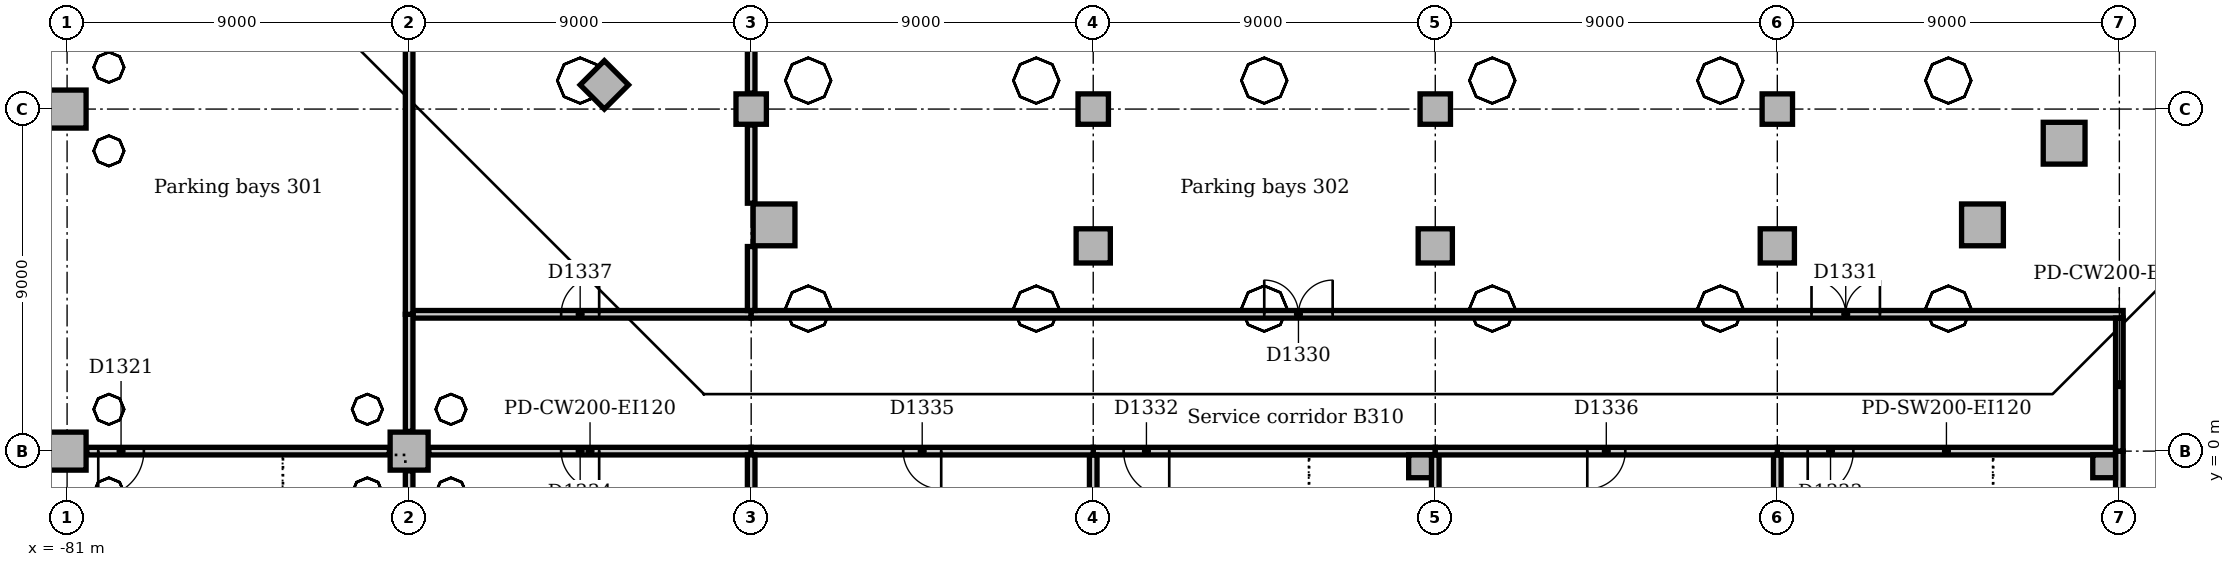
"""IFC4 building model, lengths in metres.
Left out: names, types, materials, properties, quantities, classifications, styles, units other than length and angle.
Written with IfcOpenShell. Run it as: python <this file> out.ifc"""

import sys

from ifc_helpers import new_model, si_unit, direction, frame, frame_2d, origin, origin_2d, place, context, subcontext, project, spatial, rectangle, extrude, element, fill, save


model = new_model("IFC4")
c1 = context("Model", 3, precision=1e-05, world=origin(), true_north=direction((0.0, 1.0)))
c2 = subcontext(c1, "Body", "Model", "MODEL_VIEW")
j1 = project(units=[si_unit("LENGTHUNIT", "METRE"), si_unit("PLANEANGLEUNIT", "RADIAN")], contexts=[c1])
p1 = place(None, origin())
s1 = spatial("IfcSite", under=j1, at=p1, CompositionType="ELEMENT")
p2 = place(p1, origin())
s2 = spatial("IfcBuilding", under=s1, at=p2, CompositionType="ELEMENT")
p3 = place(p2, frame((0.0, 0.0, -14.0)))
s3 = spatial("IfcBuildingStorey", under=s2, at=p3, CompositionType="ELEMENT", Elevation=-14.0)
for number, where, z_axis, x_axis in (
    (1, (-62.398, 5.953, 0.0), (0.0, 0.0, 1.0), (1.0, 0.0, 0.0)),
    (2, (-30.602, 5.953, 0.0), (0.0, 0.0, 1.0), (1.0, 0.0, 0.0)),
    (3, (-28.453, 8.102, 0.0), (0.0, 0.0, 1.0), (1.0, 0.0, 0.0)),
):
    element("IfcColumn", number, at=place(p3, frame(where, z_axis=z_axis, x_axis=x_axis)), inside=s3, PredefinedType="COLUMN", context=c2, shape_type="SweptSolid", body=[
        extrude(rectangle(XDim=1.1, YDim=1.1, at=origin_2d()), origin(), (0.0, 0.0, 1.0), 4.15),
    ])
for number, where, z_axis, x_axis in (
    (4, (-54.0, 5.4, 0.0), (0.0, 0.0, 1.0), (1.0, 0.0, 0.0)),
    (5, (-45.0, 5.4, 0.0), (0.0, 0.0, 1.0), (1.0, 0.0, 0.0)),
    (6, (-36.0, 5.4, 0.0), (0.0, 0.0, 1.0), (1.0, 0.0, 0.0)),
    (7, (-66.864, 9.636, 0.0), (0.0, 0.0, 1.0), (0.707, 0.707, 0.0)),
):
    element("IfcColumn", number, at=place(p3, frame(where, z_axis=z_axis, x_axis=x_axis)), inside=s3, PredefinedType="COLUMN", context=c2, shape_type="SweptSolid", body=[
        extrude(rectangle(XDim=0.9, YDim=0.9, at=origin_2d()), origin(), (0.0, 0.0, 1.0), 4.15),
    ])
for number, where, z_axis, x_axis in (
    (8, (-63.0, 9.0, 0.0), (0.0, 0.0, 1.0), (1.0, 0.0, 0.0)),
    (9, (-54.0, 9.0, 0.0), (0.0, 0.0, 1.0), (1.0, 0.0, 0.0)),
    (10, (-45.0, 9.0, 0.0), (0.0, 0.0, 1.0), (1.0, 0.0, 0.0)),
    (11, (-36.0, 9.0, 0.0), (0.0, 0.0, 1.0), (1.0, 0.0, 0.0)),
):
    element("IfcColumn", number, at=place(p3, frame(where, z_axis=z_axis, x_axis=x_axis)), inside=s3, PredefinedType="COLUMN", context=c2, shape_type="SweptSolid", body=[
        extrude(rectangle(XDim=0.8, YDim=0.8, at=origin_2d()), origin(), (0.0, 0.0, 1.0), 4.15),
    ])
for number, where, z_axis, x_axis in (
    (12, (-81.0, 0.0, 0.0), (0.0, 0.0, 1.0), (1.0, 0.0, 0.0)),
    (13, (-81.0, 9.0, 0.0), (0.0, 0.0, 1.0), (1.0, 0.0, 0.0)),
    (14, (-72.0, 0.0, 0.0), (0.0, 0.0, 1.0), (1.0, 0.0, 0.0)),
):
    element("IfcColumn", number, at=place(p3, frame(where, z_axis=z_axis, x_axis=x_axis)), inside=s3, PredefinedType="COLUMN", context=c2, shape_type="SweptSolid", body=[
        extrude(rectangle(XDim=1.0, YDim=1.0, at=origin_2d()), origin(), (0.0, 0.0, 1.0), 4.15),
    ])
for number, where, z_axis, x_axis in (
    (15, (-45.4, -0.4, 0.0), (0.0, 0.0, 1.0), (1.0, 0.0, 0.0)),
    (16, (-27.4, -0.4, 0.0), (0.0, 0.0, 1.0), (1.0, 0.0, 0.0)),
):
    element("IfcColumn", number, at=place(p3, frame(where, z_axis=z_axis, x_axis=x_axis)), inside=s3, PredefinedType="COLUMN", context=c2, shape_type="SweptSolid", body=[
        extrude(rectangle(XDim=0.6, YDim=0.6, at=origin_2d()), origin(), (0.0, 0.0, 1.0), 4.5),
    ])
p4 = place(p3, frame((-72.0, -4.65, 0.0), z_axis=(0.0, 0.0, 1.0), x_axis=(0.0, 1.0, 0.0)))
e17 = element("IfcWall", 17, at=p4, inside=s3, PredefinedType="SOLIDWALL", context=c2, shape_type="SweptSolid", body=[
    extrude(rectangle(XDim=4.13, YDim=0.2, at=frame_2d((2.065, 0.0))), origin(), (0.0, 0.0, 1.0), 4.15),
])
p5 = place(p3, frame((-80.48, 0.0, 0.0), z_axis=(0.0, 0.0, 1.0), x_axis=(1.0, 0.0, 0.0)))
e18 = element("IfcWall", 18, at=p5, inside=s3, PredefinedType="SOLIDWALL", context=c2, shape_type="SweptSolid", body=[
    extrude(rectangle(XDim=7.96, YDim=0.2, at=frame_2d((3.98, 0.0))), origin(), (0.0, 0.0, 1.0), 4.15),
])
p6 = place(p5, frame((0.3, 0.0, 0.0)))
e19 = element("IfcOpeningElement", 19, at=p6, cuts=e18, PredefinedType="OPENING", context=c2, shape_type="SweptSolid", body=[
    extrude(rectangle(XDim=1.2, YDim=2.1, at=frame_2d((0.6, 1.05))), frame((0.0, 0.11, 0.0), z_axis=(0.0, -1.0, 0.0), x_axis=(1.0, 0.0, 0.0)), (0.0, 0.0, 1.0), 0.22),
])
p7 = place(p3, frame((-54.0, 0.0, 0.0), z_axis=(0.0, 0.0, 1.0), x_axis=(1.0, 0.0, 0.0)))
e20 = element("IfcWall", 20, at=p7, inside=s3, PredefinedType="SOLIDWALL", context=c2, shape_type="SweptSolid", body=[
    extrude(rectangle(XDim=9.0, YDim=0.2, at=frame_2d((4.5, 0.0))), origin(), (0.0, 0.0, 1.0), 4.15),
])
p8 = place(p7, frame((0.8, 0.0, 0.0)))
e21 = element("IfcOpeningElement", 21, at=p8, cuts=e20, PredefinedType="OPENING", context=c2, shape_type="SweptSolid", body=[
    extrude(rectangle(XDim=1.2, YDim=2.1, at=frame_2d((0.6, 1.05))), frame((0.0, 0.11, 0.0), z_axis=(0.0, -1.0, 0.0), x_axis=(1.0, 0.0, 0.0)), (0.0, 0.0, 1.0), 0.22),
])
for number, where, z_axis, x_axis in (
    (22, (-54.0, -4.65, 0.0), (0.0, 0.0, 1.0), (0.0, 1.0, 0.0)),
    (23, (-45.0, -4.65, 0.0), (0.0, 0.0, 1.0), (0.0, 1.0, 0.0)),
):
    element("IfcWall", number, at=place(p3, frame(where, z_axis=z_axis, x_axis=x_axis)), inside=s3, PredefinedType="SOLIDWALL", context=c2, shape_type="SweptSolid", body=[
        extrude(rectangle(XDim=4.55, YDim=0.2, at=frame_2d((2.275, 0.0))), origin(), (0.0, 0.0, 1.0), 4.15),
    ])
p9 = place(p3, frame((-36.0, 0.0, 0.0), z_axis=(0.0, 0.0, 1.0), x_axis=(1.0, 0.0, 0.0)))
e24 = element("IfcWall", 24, at=p9, inside=s3, PredefinedType="SOLIDWALL", context=c2, shape_type="SweptSolid", body=[
    extrude(rectangle(XDim=8.9, YDim=0.2, at=frame_2d((4.45, 0.0))), origin(), (0.0, 0.0, 1.0), 4.15),
])
p10 = place(p9, frame((0.8, 0.0, 0.0)))
e25 = element("IfcOpeningElement", 25, at=p10, cuts=e24, PredefinedType="OPENING", context=c2, shape_type="SweptSolid", body=[
    extrude(rectangle(XDim=1.2, YDim=2.1, at=frame_2d((0.6, 1.05))), frame((0.0, 0.11, 0.0), z_axis=(0.0, -1.0, 0.0), x_axis=(1.0, 0.0, 0.0)), (0.0, 0.0, 1.0), 0.22),
])
for number, where, z_axis, x_axis in (
    (26, (-36.0, -4.65, 0.0), (0.0, 0.0, 1.0), (0.0, 1.0, 0.0)),
    (27, (-27.0, -4.55, 0.0), (0.0, 0.0, 1.0), (0.0, 1.0, 0.0)),
):
    element("IfcWall", number, at=place(p3, frame(where, z_axis=z_axis, x_axis=x_axis)), inside=s3, PredefinedType="SOLIDWALL", context=c2, shape_type="SweptSolid", body=[
        extrude(rectangle(XDim=4.55, YDim=0.2, at=frame_2d((2.275, 0.0))), origin(), (0.0, 0.0, 1.0), 4.15),
    ])
p11 = place(p3, frame((-71.48, 0.0, 0.0), z_axis=(0.0, 0.0, 1.0), x_axis=(1.0, 0.0, 0.0)))
e28 = element("IfcWall", 28, at=p11, inside=s3, PredefinedType="PARTITIONING", context=c2, shape_type="SweptSolid", body=[
    extrude(rectangle(XDim=8.48, YDim=0.2, at=frame_2d((4.24, 0.0))), origin(), (0.0, 0.0, 1.0), 4.15),
])
p12 = place(p11, frame((3.48, 0.0, 0.0)))
e29 = element("IfcOpeningElement", 29, at=p12, cuts=e28, PredefinedType="OPENING", context=c2, shape_type="SweptSolid", body=[
    extrude(rectangle(XDim=1.0, YDim=2.1, at=frame_2d((0.5, 1.05))), frame((0.0, 0.11, 0.0), z_axis=(0.0, -1.0, 0.0), x_axis=(1.0, 0.0, 0.0)), (0.0, 0.0, 1.0), 0.22),
])
p13 = place(p3, frame((-63.0, 0.0, 0.0), z_axis=(0.0, 0.0, 1.0), x_axis=(1.0, 0.0, 0.0)))
e30 = element("IfcWall", 30, at=p13, inside=s3, PredefinedType="PARTITIONING", context=c2, shape_type="SweptSolid", body=[
    extrude(rectangle(XDim=9.0, YDim=0.2, at=frame_2d((4.5, 0.0))), origin(), (0.0, 0.0, 1.0), 4.15),
])
p14 = place(p13, frame((4.0, 0.0, 0.0)))
e31 = element("IfcOpeningElement", 31, at=p14, cuts=e30, PredefinedType="OPENING", context=c2, shape_type="SweptSolid", body=[
    extrude(rectangle(XDim=1.0, YDim=2.1, at=frame_2d((0.5, 1.05))), frame((0.0, 0.11, 0.0), z_axis=(0.0, -1.0, 0.0), x_axis=(1.0, 0.0, 0.0)), (0.0, 0.0, 1.0), 0.22),
])
p15 = place(p3, frame((-45.0, 0.0, 0.0), z_axis=(0.0, 0.0, 1.0), x_axis=(1.0, 0.0, 0.0)))
e32 = element("IfcWall", 32, at=p15, inside=s3, PredefinedType="PARTITIONING", context=c2, shape_type="SweptSolid", body=[
    extrude(rectangle(XDim=9.0, YDim=0.2, at=frame_2d((4.5, 0.0))), origin(), (0.0, 0.0, 1.0), 4.15),
])
p16 = place(p15, frame((4.0, 0.0, 0.0)))
e33 = element("IfcOpeningElement", 33, at=p16, cuts=e32, PredefinedType="OPENING", context=c2, shape_type="SweptSolid", body=[
    extrude(rectangle(XDim=1.0, YDim=2.1, at=frame_2d((0.5, 1.05))), frame((0.0, 0.11, 0.0), z_axis=(0.0, -1.0, 0.0), x_axis=(1.0, 0.0, 0.0)), (0.0, 0.0, 1.0), 0.22),
])
p17 = place(p3, frame((-71.9, 3.6, 0.0), z_axis=(0.0, 0.0, 1.0), x_axis=(1.0, 0.0, 0.0)))
e34 = element("IfcWall", 34, at=p17, inside=s3, PredefinedType="PARTITIONING", context=c2, shape_type="SweptSolid", body=[
    extrude(rectangle(XDim=8.9, YDim=0.2, at=frame_2d((4.45, 0.0))), origin(), (0.0, 0.0, 1.0), 4.15),
])
p18 = place(p17, frame((3.9, 0.0, 0.0)))
e35 = element("IfcOpeningElement", 35, at=p18, cuts=e34, PredefinedType="OPENING", context=c2, shape_type="SweptSolid", body=[
    extrude(rectangle(XDim=1.0, YDim=2.1, at=frame_2d((0.5, 1.05))), frame((0.0, 0.11, 0.0), z_axis=(0.0, -1.0, 0.0), x_axis=(1.0, 0.0, 0.0)), (0.0, 0.0, 1.0), 0.22),
])
p19 = place(p3, frame((-63.0, 3.6, 0.0), z_axis=(0.0, 0.0, 1.0), x_axis=(1.0, 0.0, 0.0)))
e36 = element("IfcWall", 36, at=p19, inside=s3, PredefinedType="PARTITIONING", context=c2, shape_type="SweptSolid", body=[
    extrude(rectangle(XDim=36.1, YDim=0.2, at=frame_2d((18.05, 0.0))), origin(), (0.0, 0.0, 1.0), 4.15),
])
p20 = place(p19, frame((13.5, 0.0, 0.0)))
e37 = element("IfcOpeningElement", 37, at=p20, cuts=e36, PredefinedType="OPENING", context=c2, shape_type="SweptSolid", body=[
    extrude(rectangle(XDim=1.8, YDim=2.1, at=frame_2d((0.9, 1.05))), frame((0.0, 0.11, 0.0), z_axis=(0.0, -1.0, 0.0), x_axis=(1.0, 0.0, 0.0)), (0.0, 0.0, 1.0), 0.22),
])
p21 = place(p19, frame((27.9, 0.0, 0.0)))
e38 = element("IfcOpeningElement", 38, at=p21, cuts=e36, PredefinedType="OPENING", context=c2, shape_type="SweptSolid", body=[
    extrude(rectangle(XDim=1.8, YDim=2.1, at=frame_2d((0.9, 1.05))), frame((0.0, 0.11, 0.0), z_axis=(0.0, -1.0, 0.0), x_axis=(1.0, 0.0, 0.0)), (0.0, 0.0, 1.0), 0.22),
])
p22 = place(p3, frame((-27.0, 0.0, 0.0), z_axis=(0.0, 0.0, 1.0), x_axis=(0.0, 1.0, 0.0)))
e39 = element("IfcWall", 39, at=p22, inside=s3, PredefinedType="PARTITIONING", context=c2, shape_type="SweptSolid", body=[
    extrude(rectangle(XDim=3.5, YDim=0.2, at=frame_2d((1.75, 0.0))), origin(), (0.0, 0.0, 1.0), 4.15),
])
p23 = place(p3, frame((-72.0, 0.52, 0.0), z_axis=(0.0, 0.0, 1.0), x_axis=(0.0, 1.0, 0.0)))
e40 = element("IfcWall", 40, at=p23, inside=s3, PredefinedType="PARTITIONING", context=c2, shape_type="SweptSolid", body=[
    extrude(rectangle(XDim=3.08, YDim=0.2, at=frame_2d((1.54, 0.0))), origin(), (0.0, 0.0, 1.0), 4.15),
])
p24 = place(p3, frame((-63.0, -8.48, 0.0), z_axis=(0.0, 0.0, 1.0), x_axis=(0.0, 1.0, 0.0)))
e41 = element("IfcWall", 41, at=p24, inside=s3, PredefinedType="PARTITIONING", context=c2, shape_type="SweptSolid", body=[
    extrude(rectangle(XDim=8.38, YDim=0.2, at=frame_2d((4.19, 0.0))), origin(), (0.0, 0.0, 1.0), 4.15),
])
p25 = place(p3, frame((-63.0, 3.7, 0.0), z_axis=(0.0, 0.0, 1.0), x_axis=(0.0, 1.0, 0.0)))
e42 = element("IfcWall", 42, at=p25, inside=s3, PredefinedType="PARTITIONING", context=c2, shape_type="SweptSolid", body=[
    extrude(rectangle(XDim=1.683, YDim=0.2, at=frame_2d((0.842, 0.0))), origin(), (0.0, 0.0, 1.0), 4.15),
])
p26 = place(p3, frame((-63.0, 6.523, 0.0), z_axis=(0.0, 0.0, 1.0), x_axis=(0.0, 1.0, 0.0)))
e43 = element("IfcWall", 43, at=p26, inside=s3, PredefinedType="PARTITIONING", context=c2, shape_type="SweptSolid", body=[
    extrude(rectangle(XDim=2.057, YDim=0.2, at=frame_2d((1.028, 0.0))), origin(), (0.0, 0.0, 1.0), 4.15),
])
p27 = place(p3, frame((-63.0, 9.42, 0.0), z_axis=(0.0, 0.0, 1.0), x_axis=(0.0, 1.0, 0.0)))
e44 = element("IfcWall", 44, at=p27, inside=s3, PredefinedType="PARTITIONING", context=c2, shape_type="SweptSolid", body=[
    extrude(rectangle(XDim=8.16, YDim=0.2, at=frame_2d((4.08, 0.0))), origin(), (0.0, 0.0, 1.0), 4.15),
])
p28 = place(p3, frame((-72.0, 3.6, 0.0), z_axis=(0.0, 0.0, 1.0), x_axis=(0.0, 1.0, 0.0)))
e45 = element("IfcWall", 45, at=p28, inside=s3, PredefinedType="PARTITIONING", context=c2, shape_type="SweptSolid", body=[
    extrude(rectangle(XDim=17.3, YDim=0.2, at=frame_2d((8.65, 0.0))), origin(), (0.0, 0.0, 1.0), 4.15),
])
p29 = place(p6, frame((1.2, 0.0, 0.0), z_axis=(0.0, 0.0, 1.0), x_axis=(-1.0, 0.0, 0.0)))
e46 = element("IfcDoor", 46, at=p29, inside=s3, OperationType="SINGLE_SWING_RIGHT", PredefinedType="DOOR", context=c2, shape_type="SweptSolid", body=[
    extrude(rectangle(XDim=1.2, YDim=2.1, at=frame_2d((0.6, 1.05))), frame((0.0, 0.025, 0.0), z_axis=(0.0, -1.0, 0.0), x_axis=(1.0, 0.0, 0.0)), (0.0, 0.0, 1.0), 0.05),
])
fill(e19, e46)
p30 = place(p20, origin())
e47 = element("IfcDoor", 47, at=p30, inside=s3, OperationType="DOUBLE_DOOR_SINGLE_SWING", PredefinedType="DOOR", context=c2, shape_type="SweptSolid", body=[
    extrude(rectangle(XDim=1.8, YDim=2.1, at=frame_2d((0.9, 1.05))), frame((0.0, 0.025, 0.0), z_axis=(0.0, -1.0, 0.0), x_axis=(1.0, 0.0, 0.0)), (0.0, 0.0, 1.0), 0.05),
])
fill(e37, e47)
p31 = place(p21, origin())
e48 = element("IfcDoor", 48, at=p31, inside=s3, OperationType="DOUBLE_DOOR_SINGLE_SWING", PredefinedType="DOOR", context=c2, shape_type="SweptSolid", body=[
    extrude(rectangle(XDim=1.8, YDim=2.1, at=frame_2d((0.9, 1.05))), frame((0.0, 0.025, 0.0), z_axis=(0.0, -1.0, 0.0), x_axis=(1.0, 0.0, 0.0)), (0.0, 0.0, 1.0), 0.05),
])
fill(e38, e48)
p32 = place(p8, frame((1.2, 0.0, 0.0), z_axis=(0.0, 0.0, 1.0), x_axis=(-1.0, 0.0, 0.0)))
e49 = element("IfcDoor", 49, at=p32, inside=s3, OperationType="SINGLE_SWING_LEFT", PredefinedType="DOOR", context=c2, shape_type="SweptSolid", body=[
    extrude(rectangle(XDim=1.2, YDim=2.1, at=frame_2d((0.6, 1.05))), frame((0.0, 0.025, 0.0), z_axis=(0.0, -1.0, 0.0), x_axis=(1.0, 0.0, 0.0)), (0.0, 0.0, 1.0), 0.05),
])
fill(e21, e49)
p33 = place(p10, frame((1.2, 0.0, 0.0), z_axis=(0.0, 0.0, 1.0), x_axis=(-1.0, 0.0, 0.0)))
e50 = element("IfcDoor", 50, at=p33, inside=s3, OperationType="SINGLE_SWING_RIGHT", PredefinedType="DOOR", context=c2, shape_type="SweptSolid", body=[
    extrude(rectangle(XDim=1.2, YDim=2.1, at=frame_2d((0.6, 1.05))), frame((0.0, 0.025, 0.0), z_axis=(0.0, -1.0, 0.0), x_axis=(1.0, 0.0, 0.0)), (0.0, 0.0, 1.0), 0.05),
])
fill(e25, e50)
p34 = place(p12, frame((1.0, 0.0, 0.0), z_axis=(0.0, 0.0, 1.0), x_axis=(-1.0, 0.0, 0.0)))
e51 = element("IfcDoor", 51, at=p34, inside=s3, OperationType="SINGLE_SWING_LEFT", PredefinedType="DOOR", context=c2, shape_type="SweptSolid", body=[
    extrude(rectangle(XDim=1.0, YDim=2.1, at=frame_2d((0.5, 1.05))), frame((0.0, 0.025, 0.0), z_axis=(0.0, -1.0, 0.0), x_axis=(1.0, 0.0, 0.0)), (0.0, 0.0, 1.0), 0.05),
])
fill(e29, e51)
p35 = place(p14, frame((1.0, 0.0, 0.0), z_axis=(0.0, 0.0, 1.0), x_axis=(-1.0, 0.0, 0.0)))
e52 = element("IfcDoor", 52, at=p35, inside=s3, OperationType="SINGLE_SWING_LEFT", PredefinedType="DOOR", context=c2, shape_type="SweptSolid", body=[
    extrude(rectangle(XDim=1.0, YDim=2.1, at=frame_2d((0.5, 1.05))), frame((0.0, 0.025, 0.0), z_axis=(0.0, -1.0, 0.0), x_axis=(1.0, 0.0, 0.0)), (0.0, 0.0, 1.0), 0.05),
])
fill(e31, e52)
p36 = place(p16, frame((1.0, 0.0, 0.0), z_axis=(0.0, 0.0, 1.0), x_axis=(-1.0, 0.0, 0.0)))
e53 = element("IfcDoor", 53, at=p36, inside=s3, OperationType="SINGLE_SWING_RIGHT", PredefinedType="DOOR", context=c2, shape_type="SweptSolid", body=[
    extrude(rectangle(XDim=1.0, YDim=2.1, at=frame_2d((0.5, 1.05))), frame((0.0, 0.025, 0.0), z_axis=(0.0, -1.0, 0.0), x_axis=(1.0, 0.0, 0.0)), (0.0, 0.0, 1.0), 0.05),
])
fill(e33, e53)
p37 = place(p18, origin())
e54 = element("IfcDoor", 54, at=p37, inside=s3, OperationType="SINGLE_SWING_RIGHT", PredefinedType="DOOR", context=c2, shape_type="SweptSolid", body=[
    extrude(rectangle(XDim=1.0, YDim=2.1, at=frame_2d((0.5, 1.05))), frame((0.0, 0.025, 0.0), z_axis=(0.0, -1.0, 0.0), x_axis=(1.0, 0.0, 0.0)), (0.0, 0.0, 1.0), 0.05),
])
fill(e35, e54)
save(model, sys.argv[1])
